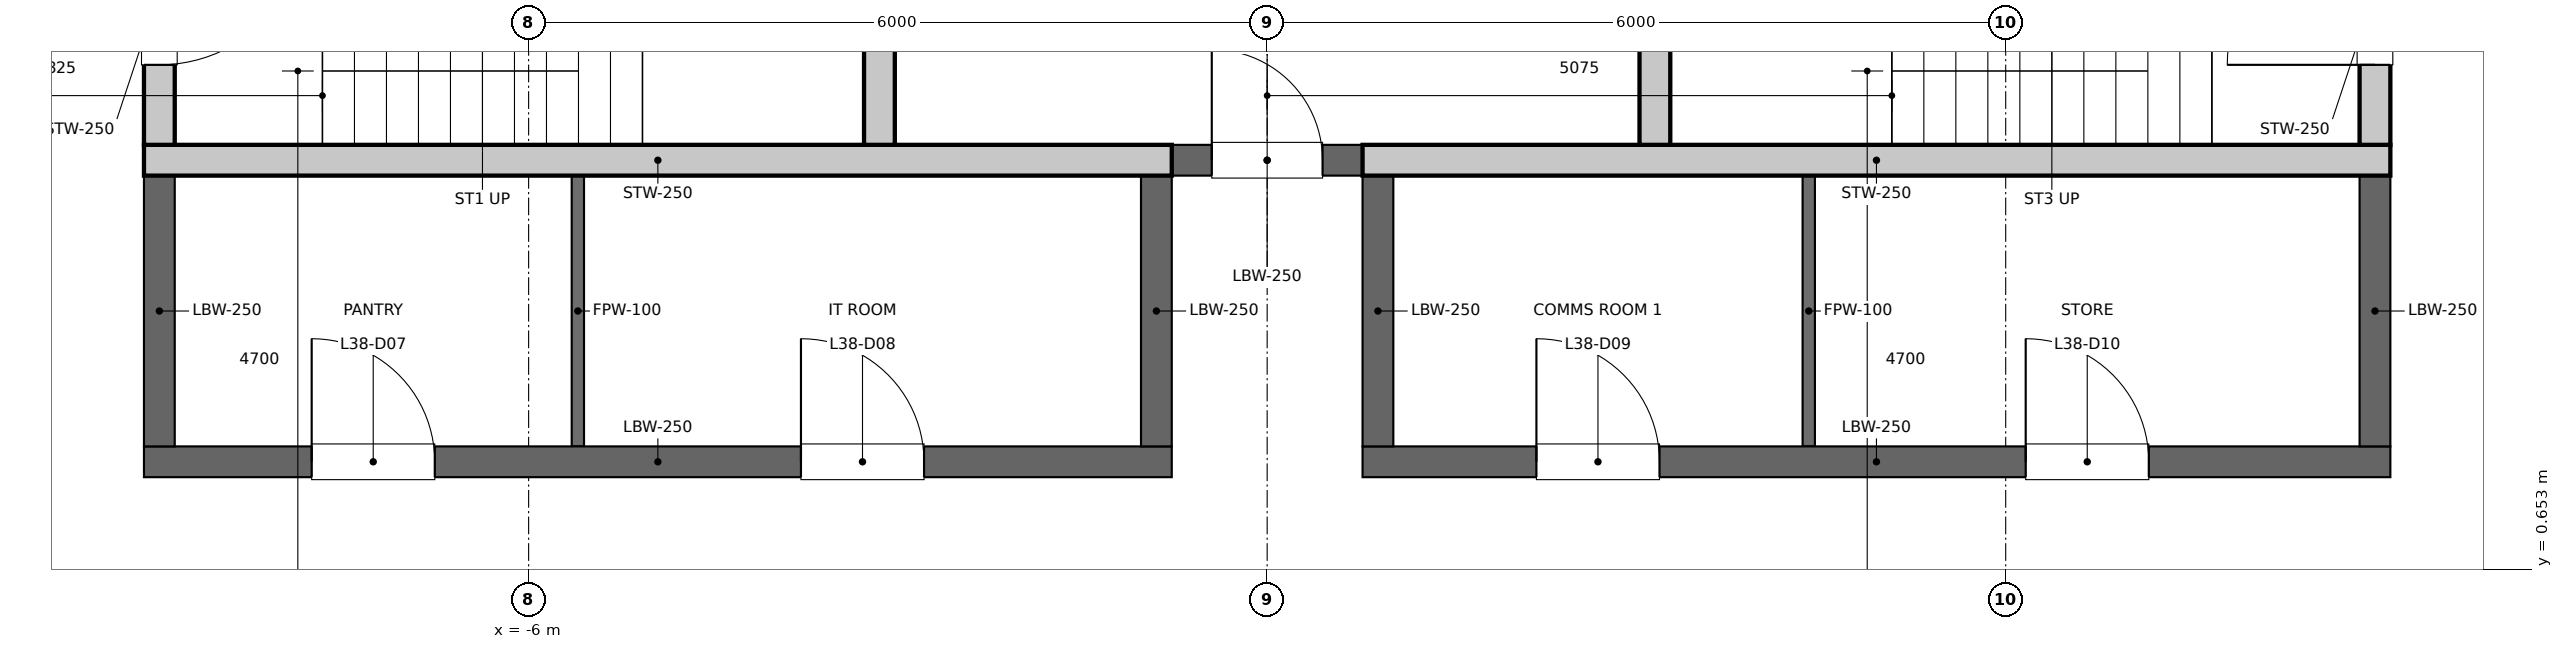
"""IFC4 building model, lengths in metres.
Left out: names, types, materials, properties, quantities, classifications, styles, units other than length and angle.
Written with IfcOpenShell. Run it as: python <this file> out.ifc"""

import sys

from ifc_helpers import new_model, si_unit, direction, frame, frame_2d, origin, place, context, subcontext, project, spatial, rectangle, extrude, element, fill, save


model = new_model("IFC4")
c1 = context("Model", 3, precision=1e-05, world=origin(), true_north=direction((0.0, 1.0)))
c2 = subcontext(c1, "Body", "Model", "MODEL_VIEW")
j1 = project(units=[si_unit("LENGTHUNIT", "METRE"), si_unit("PLANEANGLEUNIT", "RADIAN")], contexts=[c1])
p1 = place(None, origin())
s1 = spatial("IfcSite", under=j1, at=p1, CompositionType="ELEMENT")
p2 = place(p1, origin())
s2 = spatial("IfcBuilding", under=s1, at=p2, CompositionType="ELEMENT")
p3 = place(p2, frame((0.0, 0.0, 181.6)))
s3 = spatial("IfcBuildingStorey", under=s2, at=p3, CompositionType="ELEMENT", Elevation=181.6)
p4 = place(p3, frame((-9.0, 4.1, 0.0), z_axis=(0.0, 0.0, 1.0), x_axis=(0.0, 1.0, 0.0)))
e1 = element("IfcWall", 1, at=p4, inside=s3, PredefinedType="SOLIDWALL", context=c2, shape_type="SweptSolid", body=[
    extrude(rectangle(XDim=2.5, YDim=0.25, at=frame_2d((1.25, 0.0))), origin(), (0.0, 0.0, 1.0), 3.85),
])
p5 = place(p4, frame((0.65, 0.0, 0.0)))
e2 = element("IfcOpeningElement", 2, at=p5, cuts=e1, PredefinedType="OPENING", context=c2, shape_type="SweptSolid", body=[
    extrude(rectangle(XDim=1.2, YDim=2.1, at=frame_2d((0.6, 1.05))), frame((0.0, 0.125, 0.0), z_axis=(0.0, -1.0, 0.0), x_axis=(1.0, 0.0, 0.0)), (0.0, 0.0, 1.0), 0.25),
])
p6 = place(p3, frame((9.0, 4.1, 0.0), z_axis=(0.0, 0.0, 1.0), x_axis=(0.0, 1.0, 0.0)))
e3 = element("IfcWall", 3, at=p6, inside=s3, PredefinedType="SOLIDWALL", context=c2, shape_type="SweptSolid", body=[
    extrude(rectangle(XDim=2.5, YDim=0.25, at=frame_2d((1.25, 0.0))), origin(), (0.0, 0.0, 1.0), 3.85),
])
p7 = place(p6, frame((0.65, 0.0, 0.0)))
e4 = element("IfcOpeningElement", 4, at=p7, cuts=e3, PredefinedType="OPENING", context=c2, shape_type="SweptSolid", body=[
    extrude(rectangle(XDim=1.2, YDim=2.1, at=frame_2d((0.6, 1.05))), frame((0.0, 0.125, 0.0), z_axis=(0.0, -1.0, 0.0), x_axis=(1.0, 0.0, 0.0)), (0.0, 0.0, 1.0), 0.25),
])
for number, where, z_axis, x_axis in (
    (5, (-3.15, 4.1, 0.0), (0.0, 0.0, 1.0), (0.0, 1.0, 0.0)),
    (6, (3.15, 4.1, 0.0), (0.0, 0.0, 1.0), (0.0, 1.0, 0.0)),
):
    element("IfcWall", number, at=place(p3, frame(where, z_axis=z_axis, x_axis=x_axis)), inside=s3, PredefinedType="SOLIDWALL", context=c2, shape_type="SweptSolid", body=[
        extrude(rectangle(XDim=2.5, YDim=0.25, at=frame_2d((1.25, 0.0))), origin(), (0.0, 0.0, 1.0), 3.85),
    ])
p8 = place(p3, frame((-0.775, 3.975, 0.0), z_axis=(0.0, 0.0, 1.0), x_axis=(1.0, 0.0, 0.0)))
e7 = element("IfcWall", 7, at=p8, inside=s3, PredefinedType="PARTITIONING", context=c2, shape_type="SweptSolid", body=[
    extrude(rectangle(XDim=1.55, YDim=0.25, at=frame_2d((0.775, 0.0))), origin(), (0.0, 0.0, 1.0), 3.85),
])
p9 = place(p8, frame((0.325, 0.0, 0.0)))
e8 = element("IfcOpeningElement", 8, at=p9, cuts=e7, PredefinedType="OPENING", context=c2, shape_type="SweptSolid", body=[
    extrude(rectangle(XDim=0.9, YDim=2.1, at=frame_2d((0.45, 1.05))), frame((0.0, 0.125, 0.0), z_axis=(0.0, -1.0, 0.0), x_axis=(1.0, 0.0, 0.0)), (0.0, 0.0, 1.0), 0.25),
])
p10 = place(p3, frame((-9.125, 1.525, 0.0), z_axis=(0.0, 0.0, 1.0), x_axis=(1.0, 0.0, 0.0)))
e9 = element("IfcWall", 9, at=p10, inside=s3, PredefinedType="PARTITIONING", context=c2, shape_type="SweptSolid", body=[
    extrude(rectangle(XDim=8.35, YDim=0.25, at=frame_2d((4.175, 0.0))), origin(), (0.0, 0.0, 1.0), 3.85),
])
p11 = place(p10, frame((1.363, 0.0, 0.0)))
e10 = element("IfcOpeningElement", 10, at=p11, cuts=e9, PredefinedType="OPENING", context=c2, shape_type="SweptSolid", body=[
    extrude(rectangle(XDim=1.0, YDim=2.1, at=frame_2d((0.5, 1.05))), frame((0.0, 0.125, 0.0), z_axis=(0.0, -1.0, 0.0), x_axis=(1.0, 0.0, 0.0)), (0.0, 0.0, 1.0), 0.25),
])
p12 = place(p10, frame((5.337, 0.0, 0.0)))
e11 = element("IfcOpeningElement", 11, at=p12, cuts=e9, PredefinedType="OPENING", context=c2, shape_type="SweptSolid", body=[
    extrude(rectangle(XDim=1.0, YDim=2.1, at=frame_2d((0.5, 1.05))), frame((0.0, 0.125, 0.0), z_axis=(0.0, -1.0, 0.0), x_axis=(1.0, 0.0, 0.0)), (0.0, 0.0, 1.0), 0.25),
])
p13 = place(p3, frame((0.775, 1.525, 0.0), z_axis=(0.0, 0.0, 1.0), x_axis=(1.0, 0.0, 0.0)))
e12 = element("IfcWall", 12, at=p13, inside=s3, PredefinedType="PARTITIONING", context=c2, shape_type="SweptSolid", body=[
    extrude(rectangle(XDim=8.35, YDim=0.25, at=frame_2d((4.175, 0.0))), origin(), (0.0, 0.0, 1.0), 3.85),
])
p14 = place(p13, frame((1.413, 0.0, 0.0)))
e13 = element("IfcOpeningElement", 13, at=p14, cuts=e12, PredefinedType="OPENING", context=c2, shape_type="SweptSolid", body=[
    extrude(rectangle(XDim=1.0, YDim=2.1, at=frame_2d((0.5, 1.05))), frame((0.0, 0.125, 0.0), z_axis=(0.0, -1.0, 0.0), x_axis=(1.0, 0.0, 0.0)), (0.0, 0.0, 1.0), 0.25),
])
p15 = place(p13, frame((5.387, 0.0, 0.0)))
e14 = element("IfcOpeningElement", 14, at=p15, cuts=e12, PredefinedType="OPENING", context=c2, shape_type="SweptSolid", body=[
    extrude(rectangle(XDim=1.0, YDim=2.1, at=frame_2d((0.5, 1.05))), frame((0.0, 0.125, 0.0), z_axis=(0.0, -1.0, 0.0), x_axis=(1.0, 0.0, 0.0)), (0.0, 0.0, 1.0), 0.25),
])
for number, where, z_axis, x_axis in (
    (15, (-9.125, 3.975, 0.0), (0.0, 0.0, 1.0), (1.0, 0.0, 0.0)),
    (16, (0.775, 3.975, 0.0), (0.0, 0.0, 1.0), (1.0, 0.0, 0.0)),
):
    element("IfcWall", number, at=place(p3, frame(where, z_axis=z_axis, x_axis=x_axis)), inside=s3, PredefinedType="SOLIDWALL", context=c2, shape_type="SweptSolid", body=[
        extrude(rectangle(XDim=8.35, YDim=0.25, at=frame_2d((4.175, 0.0))), origin(), (0.0, 0.0, 1.0), 3.85),
    ])
for number, where, z_axis, x_axis in (
    (17, (-9.0, 1.65, 0.0), (0.0, 0.0, 1.0), (0.0, 1.0, 0.0)),
    (18, (-0.9, 1.65, 0.0), (0.0, 0.0, 1.0), (0.0, 1.0, 0.0)),
    (19, (9.0, 1.65, 0.0), (0.0, 0.0, 1.0), (0.0, 1.0, 0.0)),
    (20, (0.9, 1.65, 0.0), (0.0, 0.0, 1.0), (0.0, 1.0, 0.0)),
):
    element("IfcWall", number, at=place(p3, frame(where, z_axis=z_axis, x_axis=x_axis)), inside=s3, PredefinedType="PARTITIONING", context=c2, shape_type="SweptSolid", body=[
        extrude(rectangle(XDim=2.2, YDim=0.25, at=frame_2d((1.1, 0.0))), origin(), (0.0, 0.0, 1.0), 3.85),
    ])
for number, where, z_axis, x_axis in (
    (21, (-5.6, 1.65, 0.0), (0.0, 0.0, 1.0), (0.0, 1.0, 0.0)),
    (22, (4.4, 1.65, 0.0), (0.0, 0.0, 1.0), (0.0, 1.0, 0.0)),
):
    element("IfcWall", number, at=place(p3, frame(where, z_axis=z_axis, x_axis=x_axis)), inside=s3, PredefinedType="PARTITIONING", context=c2, shape_type="SweptSolid", body=[
        extrude(rectangle(XDim=2.2, YDim=0.1, at=frame_2d((1.1, 0.0))), origin(), (0.0, 0.0, 1.0), 3.85),
    ])
p16 = place(p5, origin())
e23 = element("IfcDoor", 23, at=p16, inside=s3, OperationType="SINGLE_SWING_RIGHT", PredefinedType="DOOR", context=c2, shape_type="SweptSolid", body=[
    extrude(rectangle(XDim=1.2, YDim=2.1, at=frame_2d((0.6, 1.05))), frame((0.0, 0.025, 0.0), z_axis=(0.0, -1.0, 0.0), x_axis=(1.0, 0.0, 0.0)), (0.0, 0.0, 1.0), 0.05),
])
fill(e2, e23)
p17 = place(p7, origin())
e24 = element("IfcDoor", 24, at=p17, inside=s3, OperationType="SINGLE_SWING_LEFT", PredefinedType="DOOR", context=c2, shape_type="SweptSolid", body=[
    extrude(rectangle(XDim=1.2, YDim=2.1, at=frame_2d((0.6, 1.05))), frame((0.0, 0.025, 0.0), z_axis=(0.0, -1.0, 0.0), x_axis=(1.0, 0.0, 0.0)), (0.0, 0.0, 1.0), 0.05),
])
fill(e4, e24)
p18 = place(p9, origin())
e25 = element("IfcDoor", 25, at=p18, inside=s3, OperationType="SINGLE_SWING_LEFT", PredefinedType="DOOR", context=c2, shape_type="SweptSolid", body=[
    extrude(rectangle(XDim=0.9, YDim=2.1, at=frame_2d((0.45, 1.05))), frame((0.0, 0.025, 0.0), z_axis=(0.0, -1.0, 0.0), x_axis=(1.0, 0.0, 0.0)), (0.0, 0.0, 1.0), 0.05),
])
fill(e8, e25)
p19 = place(p11, origin())
e26 = element("IfcDoor", 26, at=p19, inside=s3, OperationType="SINGLE_SWING_LEFT", PredefinedType="DOOR", context=c2, shape_type="SweptSolid", body=[
    extrude(rectangle(XDim=1.0, YDim=2.1, at=frame_2d((0.5, 1.05))), frame((0.0, 0.025, 0.0), z_axis=(0.0, -1.0, 0.0), x_axis=(1.0, 0.0, 0.0)), (0.0, 0.0, 1.0), 0.05),
])
fill(e10, e26)
p20 = place(p12, origin())
e27 = element("IfcDoor", 27, at=p20, inside=s3, OperationType="SINGLE_SWING_LEFT", PredefinedType="DOOR", context=c2, shape_type="SweptSolid", body=[
    extrude(rectangle(XDim=1.0, YDim=2.1, at=frame_2d((0.5, 1.05))), frame((0.0, 0.025, 0.0), z_axis=(0.0, -1.0, 0.0), x_axis=(1.0, 0.0, 0.0)), (0.0, 0.0, 1.0), 0.05),
])
fill(e11, e27)
p21 = place(p14, origin())
e28 = element("IfcDoor", 28, at=p21, inside=s3, OperationType="SINGLE_SWING_LEFT", PredefinedType="DOOR", context=c2, shape_type="SweptSolid", body=[
    extrude(rectangle(XDim=1.0, YDim=2.1, at=frame_2d((0.5, 1.05))), frame((0.0, 0.025, 0.0), z_axis=(0.0, -1.0, 0.0), x_axis=(1.0, 0.0, 0.0)), (0.0, 0.0, 1.0), 0.05),
])
fill(e13, e28)
p22 = place(p15, origin())
e29 = element("IfcDoor", 29, at=p22, inside=s3, OperationType="SINGLE_SWING_LEFT", PredefinedType="DOOR", context=c2, shape_type="SweptSolid", body=[
    extrude(rectangle(XDim=1.0, YDim=2.1, at=frame_2d((0.5, 1.05))), frame((0.0, 0.025, 0.0), z_axis=(0.0, -1.0, 0.0), x_axis=(1.0, 0.0, 0.0)), (0.0, 0.0, 1.0), 0.05),
])
fill(e14, e29)
save(model, sys.argv[1])
